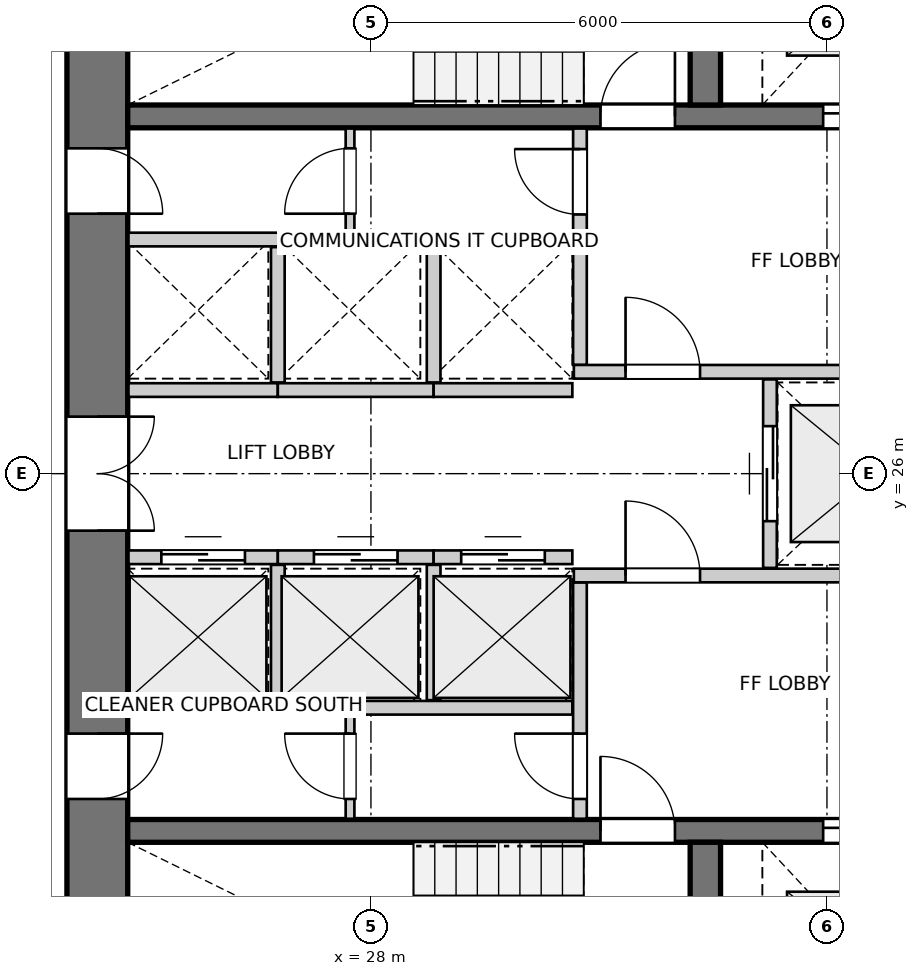
"""IFC4 building model, lengths in metres.
Left out: names, types, materials, properties, quantities, classifications, styles, units other than length and angle.
Written with IfcOpenShell. Run it as: python <this file> out.ifc"""

import sys

from ifc_helpers import new_model, si_unit, direction, frame, frame_2d, origin, place, context, subcontext, project, spatial, rectangle, extrude, source, transform, mapped, element, fill, save


model = new_model("IFC4")
c1 = context("Model", 3, precision=1e-05, world=origin(), true_north=direction((0.0, 1.0)))
c2 = subcontext(c1, "Body", "Model", "MODEL_VIEW")
j1 = project(units=[si_unit("LENGTHUNIT", "METRE"), si_unit("PLANEANGLEUNIT", "RADIAN")], contexts=[c1])
p1 = place(None, origin())
s1 = spatial("IfcSite", under=j1, at=p1, CompositionType="ELEMENT")
p2 = place(p1, origin())
s2 = spatial("IfcBuilding", under=s1, at=p2, CompositionType="ELEMENT")
p3 = place(p2, frame((0.0, 0.0, 23.8)))
s3 = spatial("IfcBuildingStorey", under=s2, at=p3, CompositionType="ELEMENT", Elevation=23.8)
p4 = place(p3, frame((24.4, 33.8, 0.0), z_axis=(0.0, 0.0, 1.0), x_axis=(0.0, -1.0, 0.0)))
e1 = element("IfcWall", 1, at=p4, inside=s3, PredefinedType="SHEAR", context=c2, shape_type="SweptSolid", body=[
    extrude(rectangle(XDim=15.6, YDim=0.8, at=frame_2d((7.8, 0.0))), origin(), (0.0, 0.0, 1.0), 2.935),
])
p5 = place(p4, frame((7.05, 0.0, 0.0)))
e2 = element("IfcOpeningElement", 2, at=p5, cuts=e1, PredefinedType="OPENING", context=c2, shape_type="SweptSolid", body=[
    extrude(rectangle(XDim=1.5, YDim=2.15, at=frame_2d((0.75, 1.075))), frame((0.0, 0.41, 0.0), z_axis=(0.0, -1.0, 0.0), x_axis=(1.0, 0.0, 0.0)), (0.0, 0.0, 1.0), 0.82),
])
p6 = place(p4, frame((3.52, 0.0, 0.0)))
e3 = element("IfcOpeningElement", 3, at=p6, cuts=e1, PredefinedType="OPENING", context=c2, shape_type="SweptSolid", body=[
    extrude(rectangle(XDim=0.86, YDim=2.05, at=frame_2d((0.43, 1.025))), frame((0.0, 0.41, 0.0), z_axis=(0.0, -1.0, 0.0), x_axis=(1.0, 0.0, 0.0)), (0.0, 0.0, 1.0), 0.82),
])
p7 = place(p4, frame((11.22, 0.0, 0.0)))
e4 = element("IfcOpeningElement", 4, at=p7, cuts=e1, PredefinedType="OPENING", context=c2, shape_type="SweptSolid", body=[
    extrude(rectangle(XDim=0.86, YDim=2.05, at=frame_2d((0.43, 1.025))), frame((0.0, 0.41, 0.0), z_axis=(0.0, -1.0, 0.0), x_axis=(1.0, 0.0, 0.0)), (0.0, 0.0, 1.0), 0.82),
])
p8 = place(p3, frame((24.8, 21.3, 0.0), z_axis=(0.0, 0.0, 1.0), x_axis=(1.0, 0.0, 0.0)))
e5 = element("IfcWall", 5, at=p8, inside=s3, PredefinedType="SHEAR", context=c2, shape_type="SweptSolid", body=[
    extrude(rectangle(XDim=11.1, YDim=0.3, at=frame_2d((5.55, 0.0))), origin(), (0.0, 0.0, 1.0), 2.935),
])
p9 = place(p8, frame((6.22, 0.0, 0.0)))
e6 = element("IfcOpeningElement", 6, at=p9, cuts=e5, PredefinedType="OPENING", context=c2, shape_type="SweptSolid", body=[
    extrude(rectangle(XDim=0.98, YDim=2.15, at=frame_2d((0.49, 1.075))), frame((0.0, 0.16, 0.0), z_axis=(0.0, -1.0, 0.0), x_axis=(1.0, 0.0, 0.0)), (0.0, 0.0, 1.0), 0.32),
])
p10 = place(p8, frame((9.15, 0.0, 0.0)))
e7 = element("IfcOpeningElement", 7, at=p10, cuts=e5, PredefinedType="OPENING", context=c2, shape_type="SweptSolid", body=[
    extrude(rectangle(XDim=1.15, YDim=2.15, at=frame_2d((0.575, 1.075))), frame((0.0, 0.16, 0.0), z_axis=(0.0, -1.0, 0.0), x_axis=(1.0, 0.0, 0.0)), (0.0, 0.0, 1.0), 0.32),
])
p11 = place(p3, frame((32.4, 18.2, 0.0), z_axis=(0.0, 0.0, 1.0), x_axis=(0.0, 1.0, 0.0)))
e8 = element("IfcWall", 8, at=p11, inside=s3, PredefinedType="SHEAR", context=c2, shape_type="SweptSolid", body=[
    extrude(rectangle(XDim=2.95, YDim=0.4, at=frame_2d((1.475, 0.0))), origin(), (0.0, 0.0, 1.0), 2.935),
])
p12 = place(p3, frame((24.8, 30.7, 0.0), z_axis=(0.0, 0.0, 1.0), x_axis=(1.0, 0.0, 0.0)))
e9 = element("IfcWall", 9, at=p12, inside=s3, PredefinedType="SHEAR", context=c2, shape_type="SweptSolid", body=[
    extrude(rectangle(XDim=11.1, YDim=0.3, at=frame_2d((5.55, 0.0))), origin(), (0.0, 0.0, 1.0), 2.935),
])
p13 = place(p12, frame((6.22, 0.0, 0.0)))
e10 = element("IfcOpeningElement", 10, at=p13, cuts=e9, PredefinedType="OPENING", context=c2, shape_type="SweptSolid", body=[
    extrude(rectangle(XDim=0.98, YDim=2.15, at=frame_2d((0.49, 1.075))), frame((0.0, 0.16, 0.0), z_axis=(0.0, -1.0, 0.0), x_axis=(1.0, 0.0, 0.0)), (0.0, 0.0, 1.0), 0.32),
])
p14 = place(p12, frame((9.15, 0.0, 0.0)))
e11 = element("IfcOpeningElement", 11, at=p14, cuts=e9, PredefinedType="OPENING", context=c2, shape_type="SweptSolid", body=[
    extrude(rectangle(XDim=1.15, YDim=2.15, at=frame_2d((0.575, 1.075))), frame((0.0, 0.16, 0.0), z_axis=(0.0, -1.0, 0.0), x_axis=(1.0, 0.0, 0.0)), (0.0, 0.0, 1.0), 0.32),
])
p15 = place(p3, frame((32.4, 30.85, 0.0), z_axis=(0.0, 0.0, 1.0), x_axis=(0.0, 1.0, 0.0)))
e12 = element("IfcWall", 12, at=p15, inside=s3, PredefinedType="SHEAR", context=c2, shape_type="SweptSolid", body=[
    extrude(rectangle(XDim=2.95, YDim=0.4, at=frame_2d((1.475, 0.0))), origin(), (0.0, 0.0, 1.0), 2.935),
])
p16 = place(p3, frame((30.75, 21.46, 0.0), z_axis=(0.0, 0.0, 1.0), x_axis=(0.0, 1.0, 0.0)))
e13 = element("IfcWall", 13, at=p16, inside=s3, PredefinedType="PARTITIONING", context=c2, shape_type="SweptSolid", body=[
    extrude(rectangle(XDim=3.11, YDim=0.18, at=frame_2d((1.555, 0.0))), origin(), (0.0, 0.0, 1.0), 2.935),
])
p17 = place(p16, frame((0.26, 0.0, 0.0)))
e14 = element("IfcOpeningElement", 14, at=p17, cuts=e13, PredefinedType="OPENING", context=c2, shape_type="SweptSolid", body=[
    extrude(rectangle(XDim=0.86, YDim=2.05, at=frame_2d((0.43, 1.025))), frame((0.0, 0.1, 0.0), z_axis=(0.0, -1.0, 0.0), x_axis=(1.0, 0.0, 0.0)), (0.0, 0.0, 1.0), 0.2),
])
p18 = place(p3, frame((30.67, 24.66, 0.0), z_axis=(0.0, 0.0, 1.0), x_axis=(1.0, 0.0, 0.0)))
e15 = element("IfcWall", 15, at=p18, inside=s3, PredefinedType="PARTITIONING", context=c2, shape_type="SweptSolid", body=[
    extrude(rectangle(XDim=5.22, YDim=0.18, at=frame_2d((2.61, 0.0))), origin(), (0.0, 0.0, 1.0), 2.935),
])
p19 = place(p18, frame((0.68, 0.0, 0.0)))
e16 = element("IfcOpeningElement", 16, at=p19, cuts=e15, PredefinedType="OPENING", context=c2, shape_type="SweptSolid", body=[
    extrude(rectangle(XDim=0.98, YDim=2.15, at=frame_2d((0.49, 1.075))), frame((0.0, 0.1, 0.0), z_axis=(0.0, -1.0, 0.0), x_axis=(1.0, 0.0, 0.0)), (0.0, 0.0, 1.0), 0.2),
])
p20 = place(p3, frame((30.75, 27.43, 0.0), z_axis=(0.0, 0.0, 1.0), x_axis=(0.0, 1.0, 0.0)))
e17 = element("IfcWall", 17, at=p20, inside=s3, PredefinedType="PARTITIONING", context=c2, shape_type="SweptSolid", body=[
    extrude(rectangle(XDim=3.11, YDim=0.18, at=frame_2d((1.555, 0.0))), origin(), (0.0, 0.0, 1.0), 2.935),
])
p21 = place(p20, frame((1.98, 0.0, 0.0)))
e18 = element("IfcOpeningElement", 18, at=p21, cuts=e17, PredefinedType="OPENING", context=c2, shape_type="SweptSolid", body=[
    extrude(rectangle(XDim=0.86, YDim=2.05, at=frame_2d((0.43, 1.025))), frame((0.0, 0.1, 0.0), z_axis=(0.0, -1.0, 0.0), x_axis=(1.0, 0.0, 0.0)), (0.0, 0.0, 1.0), 0.2),
])
p22 = place(p3, frame((30.67, 27.34, 0.0), z_axis=(0.0, 0.0, 1.0), x_axis=(1.0, 0.0, 0.0)))
e19 = element("IfcWall", 19, at=p22, inside=s3, PredefinedType="PARTITIONING", context=c2, shape_type="SweptSolid", body=[
    extrude(rectangle(XDim=5.22, YDim=0.18, at=frame_2d((2.61, 0.0))), origin(), (0.0, 0.0, 1.0), 2.935),
])
p23 = place(p22, frame((0.68, 0.0, 0.0)))
e20 = element("IfcOpeningElement", 20, at=p23, cuts=e19, PredefinedType="OPENING", context=c2, shape_type="SweptSolid", body=[
    extrude(rectangle(XDim=0.98, YDim=2.15, at=frame_2d((0.49, 1.075))), frame((0.0, 0.1, 0.0), z_axis=(0.0, -1.0, 0.0), x_axis=(1.0, 0.0, 0.0)), (0.0, 0.0, 1.0), 0.2),
])
p24 = place(p3, frame((33.25, 24.76, 0.0), z_axis=(0.0, 0.0, 1.0), x_axis=(0.0, 1.0, 0.0)))
e21 = element("IfcWall", 21, at=p24, inside=s3, PredefinedType="PARTITIONING", context=c2, shape_type="SweptSolid", body=[
    extrude(rectangle(XDim=2.48, YDim=0.18, at=frame_2d((1.24, 0.0))), origin(), (0.0, 0.0, 1.0), 2.935),
])
p25 = place(p24, frame((0.615, 0.0, 0.0)))
e22 = element("IfcOpeningElement", 22, at=p25, cuts=e21, PredefinedType="OPENING", context=c2, shape_type="SweptSolid", body=[
    extrude(rectangle(XDim=1.25, YDim=2.15, at=frame_2d((0.625, 1.075))), frame((0.0, 0.1, 0.0), z_axis=(0.0, -1.0, 0.0), x_axis=(1.0, 0.0, 0.0)), (0.0, 0.0, 1.0), 0.2),
])
p26 = place(p3, frame((24.81, 22.92, 0.0), z_axis=(0.0, 0.0, 1.0), x_axis=(1.0, 0.0, 0.0)))
e23 = element("IfcWall", 23, at=p26, inside=s3, PredefinedType="PARTITIONING", context=c2, shape_type="SweptSolid", body=[
    extrude(rectangle(XDim=5.84, YDim=0.18, at=frame_2d((2.92, 0.0))), origin(), (0.0, 0.0, 1.0), 2.935),
])
p27 = place(p3, frame((24.81, 24.9, 0.0), z_axis=(0.0, 0.0, 1.0), x_axis=(1.0, 0.0, 0.0)))
e24 = element("IfcWall", 24, at=p27, inside=s3, PredefinedType="PARTITIONING", context=c2, shape_type="SweptSolid", body=[
    extrude(rectangle(XDim=1.965, YDim=0.18, at=frame_2d((0.982, 0.0))), origin(), (0.0, 0.0, 1.0), 2.935),
])
p28 = place(p27, frame((0.433, 0.0, 0.0)))
e25 = element("IfcOpeningElement", 25, at=p28, cuts=e24, PredefinedType="OPENING", context=c2, shape_type="SweptSolid", body=[
    extrude(rectangle(XDim=1.1, YDim=2.15, at=frame_2d((0.55, 1.075))), frame((0.0, 0.1, 0.0), z_axis=(0.0, -1.0, 0.0), x_axis=(1.0, 0.0, 0.0)), (0.0, 0.0, 1.0), 0.2),
])
p29 = place(p3, frame((26.775, 24.9, 0.0), z_axis=(0.0, 0.0, 1.0), x_axis=(1.0, 0.0, 0.0)))
e26 = element("IfcWall", 26, at=p29, inside=s3, PredefinedType="PARTITIONING", context=c2, shape_type="SweptSolid", body=[
    extrude(rectangle(XDim=2.05, YDim=0.18, at=frame_2d((1.025, 0.0))), origin(), (0.0, 0.0, 1.0), 2.935),
])
p30 = place(p29, frame((0.475, 0.0, 0.0)))
e27 = element("IfcOpeningElement", 27, at=p30, cuts=e26, PredefinedType="OPENING", context=c2, shape_type="SweptSolid", body=[
    extrude(rectangle(XDim=1.1, YDim=2.15, at=frame_2d((0.55, 1.075))), frame((0.0, 0.1, 0.0), z_axis=(0.0, -1.0, 0.0), x_axis=(1.0, 0.0, 0.0)), (0.0, 0.0, 1.0), 0.2),
])
p31 = place(p3, frame((26.775, 23.02, 0.0), z_axis=(0.0, 0.0, 1.0), x_axis=(0.0, 1.0, 0.0)))
e28 = element("IfcWall", 28, at=p31, inside=s3, PredefinedType="PARTITIONING", context=c2, shape_type="SweptSolid", body=[
    extrude(rectangle(XDim=1.78, YDim=0.18, at=frame_2d((0.89, 0.0))), origin(), (0.0, 0.0, 1.0), 2.935),
])
p32 = place(p3, frame((28.825, 24.9, 0.0), z_axis=(0.0, 0.0, 1.0), x_axis=(1.0, 0.0, 0.0)))
e29 = element("IfcWall", 29, at=p32, inside=s3, PredefinedType="PARTITIONING", context=c2, shape_type="SweptSolid", body=[
    extrude(rectangle(XDim=1.825, YDim=0.18, at=frame_2d((0.913, 0.0))), origin(), (0.0, 0.0, 1.0), 2.935),
])
p33 = place(p32, frame((0.363, 0.0, 0.0)))
e30 = element("IfcOpeningElement", 30, at=p33, cuts=e29, PredefinedType="OPENING", context=c2, shape_type="SweptSolid", body=[
    extrude(rectangle(XDim=1.1, YDim=2.15, at=frame_2d((0.55, 1.075))), frame((0.0, 0.1, 0.0), z_axis=(0.0, -1.0, 0.0), x_axis=(1.0, 0.0, 0.0)), (0.0, 0.0, 1.0), 0.2),
])
p34 = place(p3, frame((28.825, 23.02, 0.0), z_axis=(0.0, 0.0, 1.0), x_axis=(0.0, 1.0, 0.0)))
e31 = element("IfcWall", 31, at=p34, inside=s3, PredefinedType="PARTITIONING", context=c2, shape_type="SweptSolid", body=[
    extrude(rectangle(XDim=1.78, YDim=0.18, at=frame_2d((0.89, 0.0))), origin(), (0.0, 0.0, 1.0), 2.935),
])
p35 = place(p3, frame((24.81, 29.08, 0.0), z_axis=(0.0, 0.0, 1.0), x_axis=(1.0, 0.0, 0.0)))
e32 = element("IfcWall", 32, at=p35, inside=s3, PredefinedType="PARTITIONING", context=c2, shape_type="SweptSolid", body=[
    extrude(rectangle(XDim=5.84, YDim=0.18, at=frame_2d((2.92, 0.0))), origin(), (0.0, 0.0, 1.0), 2.935),
])
p36 = place(p3, frame((24.81, 27.1, 0.0), z_axis=(0.0, 0.0, 1.0), x_axis=(1.0, 0.0, 0.0)))
e33 = element("IfcWall", 33, at=p36, inside=s3, PredefinedType="PARTITIONING", context=c2, shape_type="SweptSolid", body=[
    extrude(rectangle(XDim=1.965, YDim=0.18, at=frame_2d((0.982, 0.0))), origin(), (0.0, 0.0, 1.0), 2.935),
])
p37 = place(p3, frame((26.775, 27.1, 0.0), z_axis=(0.0, 0.0, 1.0), x_axis=(1.0, 0.0, 0.0)))
e34 = element("IfcWall", 34, at=p37, inside=s3, PredefinedType="PARTITIONING", context=c2, shape_type="SweptSolid", body=[
    extrude(rectangle(XDim=2.05, YDim=0.18, at=frame_2d((1.025, 0.0))), origin(), (0.0, 0.0, 1.0), 2.935),
])
p38 = place(p3, frame((26.775, 27.2, 0.0), z_axis=(0.0, 0.0, 1.0), x_axis=(0.0, 1.0, 0.0)))
e35 = element("IfcWall", 35, at=p38, inside=s3, PredefinedType="PARTITIONING", context=c2, shape_type="SweptSolid", body=[
    extrude(rectangle(XDim=1.78, YDim=0.18, at=frame_2d((0.89, 0.0))), origin(), (0.0, 0.0, 1.0), 2.935),
])
p39 = place(p3, frame((28.825, 27.1, 0.0), z_axis=(0.0, 0.0, 1.0), x_axis=(1.0, 0.0, 0.0)))
e36 = element("IfcWall", 36, at=p39, inside=s3, PredefinedType="PARTITIONING", context=c2, shape_type="SweptSolid", body=[
    extrude(rectangle(XDim=1.825, YDim=0.18, at=frame_2d((0.913, 0.0))), origin(), (0.0, 0.0, 1.0), 2.935),
])
p40 = place(p3, frame((28.825, 27.2, 0.0), z_axis=(0.0, 0.0, 1.0), x_axis=(0.0, 1.0, 0.0)))
e37 = element("IfcWall", 37, at=p40, inside=s3, PredefinedType="PARTITIONING", context=c2, shape_type="SweptSolid", body=[
    extrude(rectangle(XDim=1.78, YDim=0.18, at=frame_2d((0.89, 0.0))), origin(), (0.0, 0.0, 1.0), 2.935),
])
p41 = place(p3, frame((27.725, 21.46, 0.0), z_axis=(0.0, 0.0, 1.0), x_axis=(0.0, 1.0, 0.0)))
e38 = element("IfcWall", 38, at=p41, inside=s3, PredefinedType="PARTITIONING", context=c2, shape_type="SweptSolid", body=[
    extrude(rectangle(XDim=1.38, YDim=0.115, at=frame_2d((0.69, 0.0))), origin(), (0.0, 0.0, 1.0), 2.935),
])
p42 = place(p41, frame((0.26, 0.0, 0.0)))
e39 = element("IfcOpeningElement", 39, at=p42, cuts=e38, PredefinedType="OPENING", context=c2, shape_type="SweptSolid", body=[
    extrude(rectangle(XDim=0.86, YDim=2.05, at=frame_2d((0.43, 1.025))), frame((0.0, 0.067, 0.0), z_axis=(0.0, -1.0, 0.0), x_axis=(1.0, 0.0, 0.0)), (0.0, 0.0, 1.0), 0.135),
])
p43 = place(p3, frame((27.725, 29.16, 0.0), z_axis=(0.0, 0.0, 1.0), x_axis=(0.0, 1.0, 0.0)))
e40 = element("IfcWall", 40, at=p43, inside=s3, PredefinedType="PARTITIONING", context=c2, shape_type="SweptSolid", body=[
    extrude(rectangle(XDim=1.38, YDim=0.115, at=frame_2d((0.69, 0.0))), origin(), (0.0, 0.0, 1.0), 2.935),
])
p44 = place(p43, frame((0.26, 0.0, 0.0)))
e41 = element("IfcOpeningElement", 41, at=p44, cuts=e40, PredefinedType="OPENING", context=c2, shape_type="SweptSolid", body=[
    extrude(rectangle(XDim=0.86, YDim=2.05, at=frame_2d((0.43, 1.025))), frame((0.0, 0.067, 0.0), z_axis=(0.0, -1.0, 0.0), x_axis=(1.0, 0.0, 0.0)), (0.0, 0.0, 1.0), 0.135),
])
m1 = source(origin(), c2, "Body", "SweptSolid", [
    extrude(rectangle(XDim=0.98, YDim=2.15, at=frame_2d((0.49, 1.075))), frame((0.0, 0.025, 0.0), z_axis=(0.0, -1.0, 0.0), x_axis=(1.0, 0.0, 0.0)), (0.0, 0.0, 1.0), 0.05),
])
p45 = place(p9, origin())
e42 = element("IfcDoor", 42, at=p45, inside=s3, OperationType="SINGLE_SWING_LEFT", PredefinedType="DOOR", context=c2, shape_type="MappedRepresentation", body=[
    mapped(m1, transform((0.0, 0.0, 0.0), x_axis=(1.0, 0.0, 0.0), y_axis=(0.0, 1.0, 0.0), z_axis=(0.0, 0.0, 1.0), scale=1.0)),
])
fill(e6, e42)
m2 = source(origin(), c2, "Body", "SweptSolid", [
    extrude(rectangle(XDim=1.15, YDim=2.15, at=frame_2d((0.575, 1.075))), frame((0.0, 0.025, 0.0), z_axis=(0.0, -1.0, 0.0), x_axis=(1.0, 0.0, 0.0)), (0.0, 0.0, 1.0), 0.05),
])
p46 = place(p10, origin())
e43 = element("IfcDoor", 43, at=p46, inside=s3, OperationType="DOUBLE_DOOR_SLIDING", PredefinedType="DOOR", context=c2, shape_type="MappedRepresentation", body=[
    mapped(m2, transform((0.0, 0.0, 0.0), x_axis=(1.0, 0.0, 0.0), y_axis=(0.0, 1.0, 0.0), z_axis=(0.0, 0.0, 1.0), scale=1.0)),
])
fill(e7, e43)
p47 = place(p13, origin())
e44 = element("IfcDoor", 44, at=p47, inside=s3, OperationType="SINGLE_SWING_RIGHT", PredefinedType="DOOR", context=c2, shape_type="MappedRepresentation", body=[
    mapped(m1, transform((0.0, 0.0, 0.0), x_axis=(1.0, 0.0, 0.0), y_axis=(0.0, 1.0, 0.0), z_axis=(0.0, 0.0, 1.0), scale=1.0)),
])
fill(e10, e44)
p48 = place(p14, origin())
e45 = element("IfcDoor", 45, at=p48, inside=s3, OperationType="DOUBLE_DOOR_SLIDING", PredefinedType="DOOR", context=c2, shape_type="MappedRepresentation", body=[
    mapped(m2, transform((0.0, 0.0, 0.0), x_axis=(1.0, 0.0, 0.0), y_axis=(0.0, 1.0, 0.0), z_axis=(0.0, 0.0, 1.0), scale=1.0)),
])
fill(e11, e45)
m3 = source(origin(), c2, "Body", "SweptSolid", [
    extrude(rectangle(XDim=1.5, YDim=2.15, at=frame_2d((0.75, 1.075))), frame((0.0, 0.025, 0.0), z_axis=(0.0, -1.0, 0.0), x_axis=(1.0, 0.0, 0.0)), (0.0, 0.0, 1.0), 0.05),
])
p49 = place(p5, origin())
e46 = element("IfcDoor", 46, at=p49, inside=s3, OperationType="DOUBLE_DOOR_SINGLE_SWING", PredefinedType="DOOR", context=c2, shape_type="MappedRepresentation", body=[
    mapped(m3, transform((0.0, 0.0, 0.0), x_axis=(1.0, 0.0, 0.0), y_axis=(0.0, 1.0, 0.0), z_axis=(0.0, 0.0, 1.0), scale=1.0)),
])
fill(e2, e46)
m4 = source(origin(), c2, "Body", "SweptSolid", [
    extrude(rectangle(XDim=0.86, YDim=2.05, at=frame_2d((0.43, 1.025))), frame((0.0, 0.025, 0.0), z_axis=(0.0, -1.0, 0.0), x_axis=(1.0, 0.0, 0.0)), (0.0, 0.0, 1.0), 0.05),
])
p50 = place(p6, origin())
e47 = element("IfcDoor", 47, at=p50, inside=s3, OperationType="SINGLE_SWING_RIGHT", PredefinedType="DOOR", context=c2, shape_type="MappedRepresentation", body=[
    mapped(m4, transform((0.0, 0.0, 0.0), x_axis=(1.0, 0.0, 0.0), y_axis=(0.0, 1.0, 0.0), z_axis=(0.0, 0.0, 1.0), scale=1.0)),
])
fill(e3, e47)
p51 = place(p7, origin())
e48 = element("IfcDoor", 48, at=p51, inside=s3, OperationType="SINGLE_SWING_LEFT", PredefinedType="DOOR", context=c2, shape_type="MappedRepresentation", body=[
    mapped(m4, transform((0.0, 0.0, 0.0), x_axis=(1.0, 0.0, 0.0), y_axis=(0.0, 1.0, 0.0), z_axis=(0.0, 0.0, 1.0), scale=1.0)),
])
fill(e4, e48)
p52 = place(p17, origin())
e49 = element("IfcDoor", 49, at=p52, inside=s3, OperationType="SINGLE_SWING_RIGHT", PredefinedType="DOOR", context=c2, shape_type="MappedRepresentation", body=[
    mapped(m4, transform((0.0, 0.0, 0.0), x_axis=(1.0, 0.0, 0.0), y_axis=(0.0, 1.0, 0.0), z_axis=(0.0, 0.0, 1.0), scale=1.0)),
])
fill(e14, e49)
p53 = place(p19, origin())
e50 = element("IfcDoor", 50, at=p53, inside=s3, OperationType="SINGLE_SWING_LEFT", PredefinedType="DOOR", context=c2, shape_type="MappedRepresentation", body=[
    mapped(m1, transform((0.0, 0.0, 0.0), x_axis=(1.0, 0.0, 0.0), y_axis=(0.0, 1.0, 0.0), z_axis=(0.0, 0.0, 1.0), scale=1.0)),
])
fill(e16, e50)
p54 = place(p21, origin())
e51 = element("IfcDoor", 51, at=p54, inside=s3, OperationType="SINGLE_SWING_RIGHT", PredefinedType="DOOR", context=c2, shape_type="MappedRepresentation", body=[
    mapped(m4, transform((0.0, 0.0, 0.0), x_axis=(1.0, 0.0, 0.0), y_axis=(0.0, 1.0, 0.0), z_axis=(0.0, 0.0, 1.0), scale=1.0)),
])
fill(e18, e51)
p55 = place(p23, origin())
e52 = element("IfcDoor", 52, at=p55, inside=s3, OperationType="SINGLE_SWING_LEFT", PredefinedType="DOOR", context=c2, shape_type="MappedRepresentation", body=[
    mapped(m1, transform((0.0, 0.0, 0.0), x_axis=(1.0, 0.0, 0.0), y_axis=(0.0, 1.0, 0.0), z_axis=(0.0, 0.0, 1.0), scale=1.0)),
])
fill(e20, e52)
m5 = source(origin(), c2, "Body", "SweptSolid", [
    extrude(rectangle(XDim=1.25, YDim=2.15, at=frame_2d((0.625, 1.075))), frame((0.0, 0.025, 0.0), z_axis=(0.0, -1.0, 0.0), x_axis=(1.0, 0.0, 0.0)), (0.0, 0.0, 1.0), 0.05),
])
p56 = place(p25, origin())
e53 = element("IfcDoor", 53, at=p56, inside=s3, OperationType="DOUBLE_DOOR_SLIDING", PredefinedType="DOOR", context=c2, shape_type="MappedRepresentation", body=[
    mapped(m5, transform((0.0, 0.0, 0.0), x_axis=(1.0, 0.0, 0.0), y_axis=(0.0, 1.0, 0.0), z_axis=(0.0, 0.0, 1.0), scale=1.0)),
])
fill(e22, e53)
m6 = source(origin(), c2, "Body", "SweptSolid", [
    extrude(rectangle(XDim=1.1, YDim=2.15, at=frame_2d((0.55, 1.075))), frame((0.0, 0.025, 0.0), z_axis=(0.0, -1.0, 0.0), x_axis=(1.0, 0.0, 0.0)), (0.0, 0.0, 1.0), 0.05),
])
p57 = place(p28, origin())
e54 = element("IfcDoor", 54, at=p57, inside=s3, OperationType="DOUBLE_DOOR_SLIDING", PredefinedType="DOOR", context=c2, shape_type="MappedRepresentation", body=[
    mapped(m6, transform((0.0, 0.0, 0.0), x_axis=(1.0, 0.0, 0.0), y_axis=(0.0, 1.0, 0.0), z_axis=(0.0, 0.0, 1.0), scale=1.0)),
])
fill(e25, e54)
p58 = place(p30, origin())
e55 = element("IfcDoor", 55, at=p58, inside=s3, OperationType="DOUBLE_DOOR_SLIDING", PredefinedType="DOOR", context=c2, shape_type="MappedRepresentation", body=[
    mapped(m6, transform((0.0, 0.0, 0.0), x_axis=(1.0, 0.0, 0.0), y_axis=(0.0, 1.0, 0.0), z_axis=(0.0, 0.0, 1.0), scale=1.0)),
])
fill(e27, e55)
p59 = place(p33, origin())
e56 = element("IfcDoor", 56, at=p59, inside=s3, OperationType="DOUBLE_DOOR_SLIDING", PredefinedType="DOOR", context=c2, shape_type="MappedRepresentation", body=[
    mapped(m6, transform((0.0, 0.0, 0.0), x_axis=(1.0, 0.0, 0.0), y_axis=(0.0, 1.0, 0.0), z_axis=(0.0, 0.0, 1.0), scale=1.0)),
])
fill(e30, e56)
p60 = place(p42, origin())
e57 = element("IfcDoor", 57, at=p60, inside=s3, OperationType="SINGLE_SWING_RIGHT", PredefinedType="DOOR", context=c2, shape_type="MappedRepresentation", body=[
    mapped(m4, transform((0.0, 0.0, 0.0), x_axis=(1.0, 0.0, 0.0), y_axis=(0.0, 1.0, 0.0), z_axis=(0.0, 0.0, 1.0), scale=1.0)),
])
fill(e39, e57)
p61 = place(p44, origin())
e58 = element("IfcDoor", 58, at=p61, inside=s3, OperationType="SINGLE_SWING_LEFT", PredefinedType="DOOR", context=c2, shape_type="MappedRepresentation", body=[
    mapped(m4, transform((0.0, 0.0, 0.0), x_axis=(1.0, 0.0, 0.0), y_axis=(0.0, 1.0, 0.0), z_axis=(0.0, 0.0, 1.0), scale=1.0)),
])
fill(e41, e58)
save(model, sys.argv[1])
